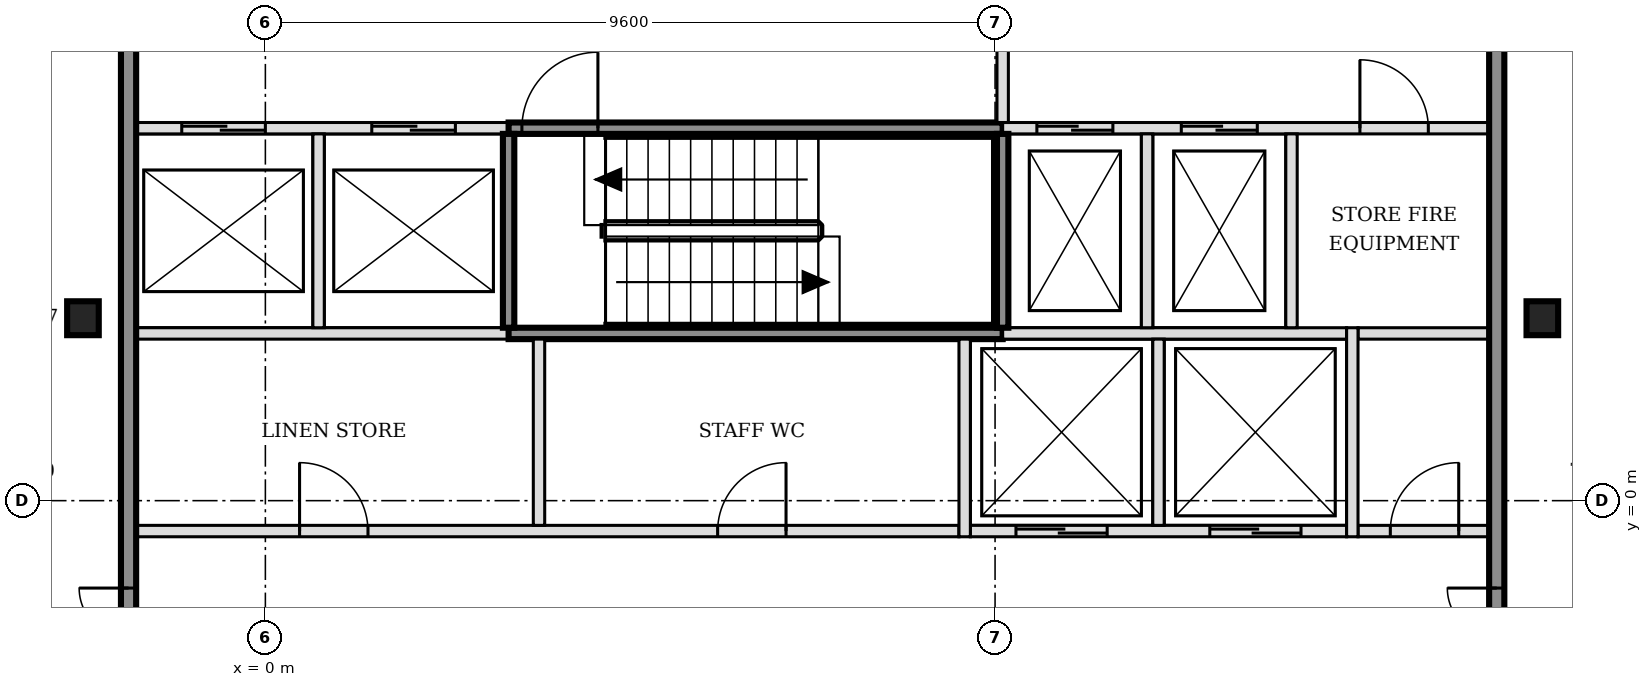
"""IFC4 building model, lengths in metres.
Left out: names, types, materials, properties, quantities, classifications, styles, units other than length and angle.
Written with IfcOpenShell. Run it as: python <this file> out.ifc"""

import sys

from ifc_helpers import new_model, si_unit, direction, frame, frame_2d, origin, origin_2d, place, context, subcontext, project, spatial, rectangle, i_section, extrude, element, fill, save


model = new_model("IFC4")
c1 = context("Model", 3, precision=1e-05, world=origin(), true_north=direction((0.0, 1.0)))
c2 = subcontext(c1, "Body", "Model", "MODEL_VIEW")
j1 = project(units=[si_unit("LENGTHUNIT", "METRE"), si_unit("PLANEANGLEUNIT", "RADIAN")], contexts=[c1])
p1 = place(None, origin())
s1 = spatial("IfcSite", under=j1, at=p1, CompositionType="ELEMENT")
p2 = place(p1, origin())
s2 = spatial("IfcBuilding", under=s1, at=p2, CompositionType="ELEMENT")
p3 = place(p2, frame((0.0, 0.0, 150.6)))
s3 = spatial("IfcBuildingStorey", under=s2, at=p3, CompositionType="ELEMENT", Elevation=150.6)
for number, where, z_axis, x_axis in (
    (1, (-2.4, 2.4, -0.15), (0.0, 0.0, 1.0), (1.0, 0.0, 0.0)),
    (2, (16.8, 2.4, -0.15), (0.0, 0.0, 1.0), (1.0, 0.0, 0.0)),
):
    element("IfcColumn", number, at=place(p3, frame(where, z_axis=z_axis, x_axis=x_axis)), inside=s3, PredefinedType="COLUMN", context=c2, shape_type="SweptSolid", body=[
        extrude(i_section(OverallWidth=0.416, OverallDepth=0.446, WebThickness=0.039, FlangeThickness=0.063, FilletRadius=0.015, at=origin_2d()), origin(), (0.0, 0.0, 1.0), 3.6),
    ])
p4 = place(p3, frame((-1.7, -0.4, 0.0), z_axis=(0.0, 0.0, 1.0), x_axis=(1.0, 0.0, 0.0)))
e3 = element("IfcWall", 3, at=p4, inside=s3, PredefinedType="PARTITIONING", context=c2, shape_type="SweptSolid", body=[
    extrude(rectangle(XDim=10.825, YDim=0.15, at=frame_2d((5.413, 0.0))), origin(), (0.0, 0.0, 1.0), 3.45),
])
p5 = place(p4, frame((2.15, 0.0, 0.0)))
e4 = element("IfcOpeningElement", 4, at=p5, cuts=e3, PredefinedType="OPENING", context=c2, shape_type="SweptSolid", body=[
    extrude(rectangle(XDim=0.9, YDim=2.1, at=frame_2d((0.45, 1.05))), frame((0.0, 0.085, 0.0), z_axis=(0.0, -1.0, 0.0), x_axis=(1.0, 0.0, 0.0)), (0.0, 0.0, 1.0), 0.17),
])
p6 = place(p4, frame((7.65, 0.0, 0.0)))
e5 = element("IfcOpeningElement", 5, at=p6, cuts=e3, PredefinedType="OPENING", context=c2, shape_type="SweptSolid", body=[
    extrude(rectangle(XDim=0.9, YDim=2.1, at=frame_2d((0.45, 1.05))), frame((0.0, 0.085, 0.0), z_axis=(0.0, -1.0, 0.0), x_axis=(1.0, 0.0, 0.0)), (0.0, 0.0, 1.0), 0.17),
])
p7 = place(p3, frame((9.275, -0.4, 0.0), z_axis=(0.0, 0.0, 1.0), x_axis=(1.0, 0.0, 0.0)))
e6 = element("IfcWall", 6, at=p7, inside=s3, PredefinedType="SOLIDWALL", context=c2, shape_type="SweptSolid", body=[
    extrude(rectangle(XDim=4.95, YDim=0.15, at=frame_2d((2.475, 0.0))), origin(), (0.0, 0.0, 1.0), 3.45),
])
p8 = place(p7, frame((0.6, 0.0, 0.0)))
e7 = element("IfcOpeningElement", 7, at=p8, cuts=e6, PredefinedType="OPENING", context=c2, shape_type="SweptSolid", body=[
    extrude(rectangle(XDim=1.2, YDim=2.1, at=frame_2d((0.6, 1.05))), frame((0.0, 0.085, 0.0), z_axis=(0.0, -1.0, 0.0), x_axis=(1.0, 0.0, 0.0)), (0.0, 0.0, 1.0), 0.17),
])
p9 = place(p7, frame((3.15, 0.0, 0.0)))
e8 = element("IfcOpeningElement", 8, at=p9, cuts=e6, PredefinedType="OPENING", context=c2, shape_type="SweptSolid", body=[
    extrude(rectangle(XDim=1.2, YDim=2.1, at=frame_2d((0.6, 1.05))), frame((0.0, 0.085, 0.0), z_axis=(0.0, -1.0, 0.0), x_axis=(1.0, 0.0, 0.0)), (0.0, 0.0, 1.0), 0.17),
])
p10 = place(p3, frame((14.375, -0.4, 0.0), z_axis=(0.0, 0.0, 1.0), x_axis=(1.0, 0.0, 0.0)))
e9 = element("IfcWall", 9, at=p10, inside=s3, PredefinedType="PARTITIONING", context=c2, shape_type="SweptSolid", body=[
    extrude(rectangle(XDim=1.725, YDim=0.15, at=frame_2d((0.863, 0.0))), origin(), (0.0, 0.0, 1.0), 3.45),
])
p11 = place(p10, frame((0.425, 0.0, 0.0)))
e10 = element("IfcOpeningElement", 10, at=p11, cuts=e9, PredefinedType="OPENING", context=c2, shape_type="SweptSolid", body=[
    extrude(rectangle(XDim=0.9, YDim=2.1, at=frame_2d((0.45, 1.05))), frame((0.0, 0.085, 0.0), z_axis=(0.0, -1.0, 0.0), x_axis=(1.0, 0.0, 0.0)), (0.0, 0.0, 1.0), 0.17),
])
p12 = place(p3, frame((-1.7, 2.2, 0.0), z_axis=(0.0, 0.0, 1.0), x_axis=(1.0, 0.0, 0.0)))
e11 = element("IfcWall", 11, at=p12, inside=s3, PredefinedType="SOLIDWALL", context=c2, shape_type="SweptSolid", body=[
    extrude(rectangle(XDim=4.9, YDim=0.15, at=frame_2d((2.45, 0.0))), origin(), (0.0, 0.0, 1.0), 3.45),
])
p13 = place(p3, frame((3.2, 2.2, 0.0), z_axis=(0.0, 0.0, 1.0), x_axis=(1.0, 0.0, 0.0)))
e12 = element("IfcWall", 12, at=p13, inside=s3, PredefinedType="SOLIDWALL", context=c2, shape_type="SweptSolid", body=[
    extrude(rectangle(XDim=6.5, YDim=0.15, at=frame_2d((3.25, 0.0))), origin(), (0.0, 0.0, 1.0), 3.45),
])
p14 = place(p3, frame((9.7, 2.2, 0.0), z_axis=(0.0, 0.0, 1.0), x_axis=(1.0, 0.0, 0.0)))
e13 = element("IfcWall", 13, at=p14, inside=s3, PredefinedType="SOLIDWALL", context=c2, shape_type="SweptSolid", body=[
    extrude(rectangle(XDim=4.525, YDim=0.15, at=frame_2d((2.263, 0.0))), origin(), (0.0, 0.0, 1.0), 3.45),
])
p15 = place(p3, frame((14.375, 2.2, 0.0), z_axis=(0.0, 0.0, 1.0), x_axis=(1.0, 0.0, 0.0)))
e14 = element("IfcWall", 14, at=p15, inside=s3, PredefinedType="PARTITIONING", context=c2, shape_type="SweptSolid", body=[
    extrude(rectangle(XDim=1.725, YDim=0.15, at=frame_2d((0.863, 0.0))), origin(), (0.0, 0.0, 1.0), 3.45),
])
p16 = place(p3, frame((-1.7, 4.9, 0.0), z_axis=(0.0, 0.0, 1.0), x_axis=(1.0, 0.0, 0.0)))
e15 = element("IfcWall", 15, at=p16, inside=s3, PredefinedType="SOLIDWALL", context=c2, shape_type="SweptSolid", body=[
    extrude(rectangle(XDim=4.9, YDim=0.15, at=frame_2d((2.45, 0.0))), origin(), (0.0, 0.0, 1.0), 3.45),
])
p17 = place(p16, frame((0.6, 0.0, 0.0)))
e16 = element("IfcOpeningElement", 16, at=p17, cuts=e15, PredefinedType="OPENING", context=c2, shape_type="SweptSolid", body=[
    extrude(rectangle(XDim=1.1, YDim=2.1, at=frame_2d((0.55, 1.05))), frame((0.0, 0.085, 0.0), z_axis=(0.0, -1.0, 0.0), x_axis=(1.0, 0.0, 0.0)), (0.0, 0.0, 1.0), 0.17),
])
p18 = place(p16, frame((3.1, 0.0, 0.0)))
e17 = element("IfcOpeningElement", 17, at=p18, cuts=e15, PredefinedType="OPENING", context=c2, shape_type="SweptSolid", body=[
    extrude(rectangle(XDim=1.1, YDim=2.1, at=frame_2d((0.55, 1.05))), frame((0.0, 0.085, 0.0), z_axis=(0.0, -1.0, 0.0), x_axis=(1.0, 0.0, 0.0)), (0.0, 0.0, 1.0), 0.17),
])
p19 = place(p3, frame((3.2, 4.9, 0.0), z_axis=(0.0, 0.0, 1.0), x_axis=(1.0, 0.0, 0.0)))
e18 = element("IfcWall", 18, at=p19, inside=s3, PredefinedType="SOLIDWALL", context=c2, shape_type="SweptSolid", body=[
    extrude(rectangle(XDim=6.5, YDim=0.15, at=frame_2d((3.25, 0.0))), origin(), (0.0, 0.0, 1.0), 3.45),
])
p20 = place(p19, frame((0.175, 0.0, 0.0)))
e19 = element("IfcOpeningElement", 19, at=p20, cuts=e18, PredefinedType="OPENING", context=c2, shape_type="SweptSolid", body=[
    extrude(rectangle(XDim=1.0, YDim=2.1, at=frame_2d((0.5, 1.05))), frame((0.0, 0.085, 0.0), z_axis=(0.0, -1.0, 0.0), x_axis=(1.0, 0.0, 0.0)), (0.0, 0.0, 1.0), 0.17),
])
p21 = place(p3, frame((9.7, 4.9, 0.0), z_axis=(0.0, 0.0, 1.0), x_axis=(1.0, 0.0, 0.0)))
e20 = element("IfcWall", 20, at=p21, inside=s3, PredefinedType="SOLIDWALL", context=c2, shape_type="SweptSolid", body=[
    extrude(rectangle(XDim=6.4, YDim=0.15, at=frame_2d((3.2, 0.0))), origin(), (0.0, 0.0, 1.0), 3.45),
])
p22 = place(p21, frame((0.45, 0.0, 0.0)))
e21 = element("IfcOpeningElement", 21, at=p22, cuts=e20, PredefinedType="OPENING", context=c2, shape_type="SweptSolid", body=[
    extrude(rectangle(XDim=1.0, YDim=2.1, at=frame_2d((0.5, 1.05))), frame((0.0, 0.085, 0.0), z_axis=(0.0, -1.0, 0.0), x_axis=(1.0, 0.0, 0.0)), (0.0, 0.0, 1.0), 0.17),
])
p23 = place(p21, frame((2.35, 0.0, 0.0)))
e22 = element("IfcOpeningElement", 22, at=p23, cuts=e20, PredefinedType="OPENING", context=c2, shape_type="SweptSolid", body=[
    extrude(rectangle(XDim=1.0, YDim=2.1, at=frame_2d((0.5, 1.05))), frame((0.0, 0.085, 0.0), z_axis=(0.0, -1.0, 0.0), x_axis=(1.0, 0.0, 0.0)), (0.0, 0.0, 1.0), 0.17),
])
p24 = place(p21, frame((4.7, 0.0, 0.0)))
e23 = element("IfcOpeningElement", 23, at=p24, cuts=e20, PredefinedType="OPENING", context=c2, shape_type="SweptSolid", body=[
    extrude(rectangle(XDim=0.9, YDim=2.1, at=frame_2d((0.45, 1.05))), frame((0.0, 0.085, 0.0), z_axis=(0.0, -1.0, 0.0), x_axis=(1.0, 0.0, 0.0)), (0.0, 0.0, 1.0), 0.17),
])
p25 = place(p3, frame((-1.8, -5.5, 0.0), z_axis=(0.0, 0.0, 1.0), x_axis=(0.0, 1.0, 0.0)))
e24 = element("IfcWall", 24, at=p25, inside=s3, PredefinedType="SOLIDWALL", context=c2, shape_type="SweptSolid", body=[
    extrude(rectangle(XDim=15.8, YDim=0.2, at=frame_2d((7.9, 0.0))), origin(), (0.0, 0.0, 1.0), 3.45),
])
p26 = place(p25, frame((3.05, 0.0, 0.0)))
e25 = element("IfcOpeningElement", 25, at=p26, cuts=e24, PredefinedType="OPENING", context=c2, shape_type="SweptSolid", body=[
    extrude(rectangle(XDim=1.3, YDim=2.1, at=frame_2d((0.65, 1.05))), frame((0.0, 0.11, 0.0), z_axis=(0.0, -1.0, 0.0), x_axis=(1.0, 0.0, 0.0)), (0.0, 0.0, 1.0), 0.22),
])
p27 = place(p25, frame((11.45, 0.0, 0.0)))
e26 = element("IfcOpeningElement", 26, at=p27, cuts=e24, PredefinedType="OPENING", context=c2, shape_type="SweptSolid", body=[
    extrude(rectangle(XDim=1.3, YDim=2.1, at=frame_2d((0.65, 1.05))), frame((0.0, 0.11, 0.0), z_axis=(0.0, -1.0, 0.0), x_axis=(1.0, 0.0, 0.0)), (0.0, 0.0, 1.0), 0.22),
])
for number, where, z_axis, x_axis in (
    (27, (0.7, 2.275, 0.0), (0.0, 0.0, 1.0), (0.0, 1.0, 0.0)),
    (28, (3.2, 2.275, 0.0), (0.0, 0.0, 1.0), (0.0, 1.0, 0.0)),
):
    element("IfcWall", number, at=place(p3, frame(where, z_axis=z_axis, x_axis=x_axis)), inside=s3, PredefinedType="SOLIDWALL", context=c2, shape_type="SweptSolid", body=[
        extrude(rectangle(XDim=2.55, YDim=0.15, at=frame_2d((1.275, 0.0))), origin(), (0.0, 0.0, 1.0), 3.45),
    ])
p28 = place(p3, frame((3.6, -0.325, 0.0), z_axis=(0.0, 0.0, 1.0), x_axis=(0.0, 1.0, 0.0)))
e29 = element("IfcWall", 29, at=p28, inside=s3, PredefinedType="PARTITIONING", context=c2, shape_type="SweptSolid", body=[
    extrude(rectangle(XDim=2.45, YDim=0.15, at=frame_2d((1.225, 0.0))), origin(), (0.0, 0.0, 1.0), 3.45),
])
p29 = place(p3, frame((9.2, -0.475, 0.0), z_axis=(0.0, 0.0, 1.0), x_axis=(0.0, 1.0, 0.0)))
e30 = element("IfcWall", 30, at=p29, inside=s3, PredefinedType="SOLIDWALL", context=c2, shape_type="SweptSolid", body=[
    extrude(rectangle(XDim=2.6, YDim=0.15, at=frame_2d((1.3, 0.0))), origin(), (0.0, 0.0, 1.0), 3.45),
])
p30 = place(p3, frame((9.7, 2.275, 0.0), z_axis=(0.0, 0.0, 1.0), x_axis=(0.0, 1.0, 0.0)))
e31 = element("IfcWall", 31, at=p30, inside=s3, PredefinedType="SOLIDWALL", context=c2, shape_type="SweptSolid", body=[
    extrude(rectangle(XDim=2.55, YDim=0.15, at=frame_2d((1.275, 0.0))), origin(), (0.0, 0.0, 1.0), 3.45),
])
p31 = place(p3, frame((9.7, 4.975, 0.0), z_axis=(0.0, 0.0, 1.0), x_axis=(0.0, 1.0, 0.0)))
e32 = element("IfcWall", 32, at=p31, inside=s3, PredefinedType="SOLIDWALL", context=c2, shape_type="SweptSolid", body=[
    extrude(rectangle(XDim=2.45, YDim=0.15, at=frame_2d((1.225, 0.0))), origin(), (0.0, 0.0, 1.0), 3.45),
])
p32 = place(p3, frame((11.6, 2.275, 0.0), z_axis=(0.0, 0.0, 1.0), x_axis=(0.0, 1.0, 0.0)))
e33 = element("IfcWall", 33, at=p32, inside=s3, PredefinedType="SOLIDWALL", context=c2, shape_type="SweptSolid", body=[
    extrude(rectangle(XDim=2.55, YDim=0.15, at=frame_2d((1.275, 0.0))), origin(), (0.0, 0.0, 1.0), 3.45),
])
p33 = place(p3, frame((11.75, -0.325, 0.0), z_axis=(0.0, 0.0, 1.0), x_axis=(0.0, 1.0, 0.0)))
e34 = element("IfcWall", 34, at=p33, inside=s3, PredefinedType="SOLIDWALL", context=c2, shape_type="SweptSolid", body=[
    extrude(rectangle(XDim=2.45, YDim=0.15, at=frame_2d((1.225, 0.0))), origin(), (0.0, 0.0, 1.0), 3.45),
])
p34 = place(p3, frame((13.5, 2.275, 0.0), z_axis=(0.0, 0.0, 1.0), x_axis=(0.0, 1.0, 0.0)))
e35 = element("IfcWall", 35, at=p34, inside=s3, PredefinedType="SOLIDWALL", context=c2, shape_type="SweptSolid", body=[
    extrude(rectangle(XDim=2.55, YDim=0.15, at=frame_2d((1.275, 0.0))), origin(), (0.0, 0.0, 1.0), 3.45),
])
p35 = place(p3, frame((14.3, -0.475, 0.0), z_axis=(0.0, 0.0, 1.0), x_axis=(0.0, 1.0, 0.0)))
e36 = element("IfcWall", 36, at=p35, inside=s3, PredefinedType="SOLIDWALL", context=c2, shape_type="SweptSolid", body=[
    extrude(rectangle(XDim=2.75, YDim=0.15, at=frame_2d((1.375, 0.0))), origin(), (0.0, 0.0, 1.0), 3.45),
])
p36 = place(p3, frame((16.2, -5.5, 0.0), z_axis=(0.0, 0.0, 1.0), x_axis=(0.0, 1.0, 0.0)))
e37 = element("IfcWall", 37, at=p36, inside=s3, PredefinedType="SOLIDWALL", context=c2, shape_type="SweptSolid", body=[
    extrude(rectangle(XDim=15.8, YDim=0.2, at=frame_2d((7.9, 0.0))), origin(), (0.0, 0.0, 1.0), 3.45),
])
p37 = place(p36, frame((3.05, 0.0, 0.0)))
e38 = element("IfcOpeningElement", 38, at=p37, cuts=e37, PredefinedType="OPENING", context=c2, shape_type="SweptSolid", body=[
    extrude(rectangle(XDim=1.3, YDim=2.1, at=frame_2d((0.65, 1.05))), frame((0.0, 0.11, 0.0), z_axis=(0.0, -1.0, 0.0), x_axis=(1.0, 0.0, 0.0)), (0.0, 0.0, 1.0), 0.22),
])
p38 = place(p36, frame((11.45, 0.0, 0.0)))
e39 = element("IfcOpeningElement", 39, at=p38, cuts=e37, PredefinedType="OPENING", context=c2, shape_type="SweptSolid", body=[
    extrude(rectangle(XDim=1.3, YDim=2.1, at=frame_2d((0.65, 1.05))), frame((0.0, 0.11, 0.0), z_axis=(0.0, -1.0, 0.0), x_axis=(1.0, 0.0, 0.0)), (0.0, 0.0, 1.0), 0.22),
])
p39 = place(p8, origin())
e40 = element("IfcDoor", 40, at=p39, inside=s3, OperationType="DOUBLE_DOOR_SLIDING", PredefinedType="DOOR", context=c2, shape_type="SweptSolid", body=[
    extrude(rectangle(XDim=1.2, YDim=2.1, at=frame_2d((0.6, 1.05))), frame((0.0, 0.025, 0.0), z_axis=(0.0, -1.0, 0.0), x_axis=(1.0, 0.0, 0.0)), (0.0, 0.0, 1.0), 0.05),
])
fill(e7, e40)
p40 = place(p9, origin())
e41 = element("IfcDoor", 41, at=p40, inside=s3, OperationType="DOUBLE_DOOR_SLIDING", PredefinedType="DOOR", context=c2, shape_type="SweptSolid", body=[
    extrude(rectangle(XDim=1.2, YDim=2.1, at=frame_2d((0.6, 1.05))), frame((0.0, 0.025, 0.0), z_axis=(0.0, -1.0, 0.0), x_axis=(1.0, 0.0, 0.0)), (0.0, 0.0, 1.0), 0.05),
])
fill(e8, e41)
p41 = place(p17, origin())
e42 = element("IfcDoor", 42, at=p41, inside=s3, OperationType="DOUBLE_DOOR_SLIDING", PredefinedType="DOOR", context=c2, shape_type="SweptSolid", body=[
    extrude(rectangle(XDim=1.1, YDim=2.1, at=frame_2d((0.55, 1.05))), frame((0.0, 0.025, 0.0), z_axis=(0.0, -1.0, 0.0), x_axis=(1.0, 0.0, 0.0)), (0.0, 0.0, 1.0), 0.05),
])
fill(e16, e42)
p42 = place(p18, origin())
e43 = element("IfcDoor", 43, at=p42, inside=s3, OperationType="DOUBLE_DOOR_SLIDING", PredefinedType="DOOR", context=c2, shape_type="SweptSolid", body=[
    extrude(rectangle(XDim=1.1, YDim=2.1, at=frame_2d((0.55, 1.05))), frame((0.0, 0.025, 0.0), z_axis=(0.0, -1.0, 0.0), x_axis=(1.0, 0.0, 0.0)), (0.0, 0.0, 1.0), 0.05),
])
fill(e17, e43)
p43 = place(p22, origin())
e44 = element("IfcDoor", 44, at=p43, inside=s3, OperationType="DOUBLE_DOOR_SLIDING", PredefinedType="DOOR", context=c2, shape_type="SweptSolid", body=[
    extrude(rectangle(XDim=1.0, YDim=2.1, at=frame_2d((0.5, 1.05))), frame((0.0, 0.025, 0.0), z_axis=(0.0, -1.0, 0.0), x_axis=(1.0, 0.0, 0.0)), (0.0, 0.0, 1.0), 0.05),
])
fill(e21, e44)
p44 = place(p23, origin())
e45 = element("IfcDoor", 45, at=p44, inside=s3, OperationType="DOUBLE_DOOR_SLIDING", PredefinedType="DOOR", context=c2, shape_type="SweptSolid", body=[
    extrude(rectangle(XDim=1.0, YDim=2.1, at=frame_2d((0.5, 1.05))), frame((0.0, 0.025, 0.0), z_axis=(0.0, -1.0, 0.0), x_axis=(1.0, 0.0, 0.0)), (0.0, 0.0, 1.0), 0.05),
])
fill(e22, e45)
p45 = place(p20, origin())
e46 = element("IfcDoor", 46, at=p45, inside=s3, OperationType="SINGLE_SWING_RIGHT", PredefinedType="DOOR", context=c2, shape_type="SweptSolid", body=[
    extrude(rectangle(XDim=1.0, YDim=2.1, at=frame_2d((0.5, 1.05))), frame((0.0, 0.025, 0.0), z_axis=(0.0, -1.0, 0.0), x_axis=(1.0, 0.0, 0.0)), (0.0, 0.0, 1.0), 0.05),
])
fill(e19, e46)
p46 = place(p26, origin())
e47 = element("IfcDoor", 47, at=p46, inside=s3, OperationType="DOUBLE_DOOR_SINGLE_SWING", PredefinedType="DOOR", context=c2, shape_type="SweptSolid", body=[
    extrude(rectangle(XDim=1.3, YDim=2.1, at=frame_2d((0.65, 1.05))), frame((0.0, 0.025, 0.0), z_axis=(0.0, -1.0, 0.0), x_axis=(1.0, 0.0, 0.0)), (0.0, 0.0, 1.0), 0.05),
])
fill(e25, e47)
p47 = place(p37, origin())
e48 = element("IfcDoor", 48, at=p47, inside=s3, OperationType="DOUBLE_DOOR_SINGLE_SWING", PredefinedType="DOOR", context=c2, shape_type="SweptSolid", body=[
    extrude(rectangle(XDim=1.3, YDim=2.1, at=frame_2d((0.65, 1.05))), frame((0.0, 0.025, 0.0), z_axis=(0.0, -1.0, 0.0), x_axis=(1.0, 0.0, 0.0)), (0.0, 0.0, 1.0), 0.05),
])
fill(e38, e48)
p48 = place(p11, origin())
e49 = element("IfcDoor", 49, at=p48, inside=s3, OperationType="SINGLE_SWING_RIGHT", PredefinedType="DOOR", context=c2, shape_type="SweptSolid", body=[
    extrude(rectangle(XDim=0.9, YDim=2.1, at=frame_2d((0.45, 1.05))), frame((0.0, 0.025, 0.0), z_axis=(0.0, -1.0, 0.0), x_axis=(1.0, 0.0, 0.0)), (0.0, 0.0, 1.0), 0.05),
])
fill(e10, e49)
p49 = place(p24, origin())
e50 = element("IfcDoor", 50, at=p49, inside=s3, OperationType="SINGLE_SWING_LEFT", PredefinedType="DOOR", context=c2, shape_type="SweptSolid", body=[
    extrude(rectangle(XDim=0.9, YDim=2.1, at=frame_2d((0.45, 1.05))), frame((0.0, 0.025, 0.0), z_axis=(0.0, -1.0, 0.0), x_axis=(1.0, 0.0, 0.0)), (0.0, 0.0, 1.0), 0.05),
])
fill(e23, e50)
p50 = place(p5, origin())
e51 = element("IfcDoor", 51, at=p50, inside=s3, OperationType="SINGLE_SWING_LEFT", PredefinedType="DOOR", context=c2, shape_type="SweptSolid", body=[
    extrude(rectangle(XDim=0.9, YDim=2.1, at=frame_2d((0.45, 1.05))), frame((0.0, 0.025, 0.0), z_axis=(0.0, -1.0, 0.0), x_axis=(1.0, 0.0, 0.0)), (0.0, 0.0, 1.0), 0.05),
])
fill(e4, e51)
p51 = place(p6, origin())
e52 = element("IfcDoor", 52, at=p51, inside=s3, OperationType="SINGLE_SWING_RIGHT", PredefinedType="DOOR", context=c2, shape_type="SweptSolid", body=[
    extrude(rectangle(XDim=0.9, YDim=2.1, at=frame_2d((0.45, 1.05))), frame((0.0, 0.025, 0.0), z_axis=(0.0, -1.0, 0.0), x_axis=(1.0, 0.0, 0.0)), (0.0, 0.0, 1.0), 0.05),
])
fill(e5, e52)
save(model, sys.argv[1])
